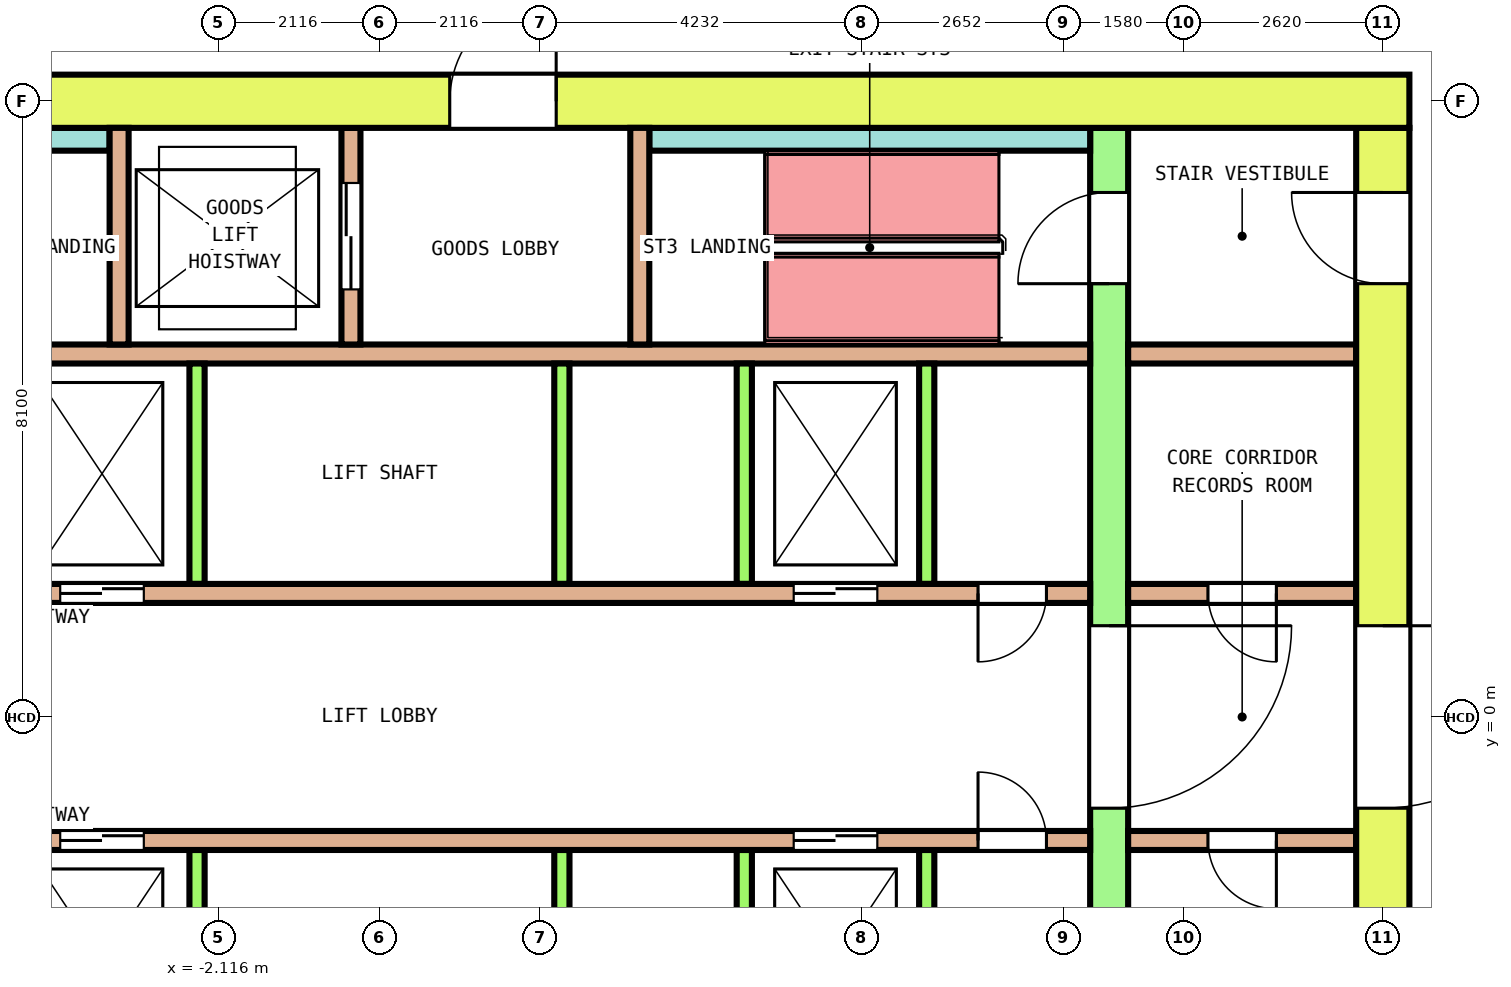
"""IFC4 building model, lengths in metres.
Left out: names, types, materials, properties, quantities, classifications, styles, units other than length and angle.
Written with IfcOpenShell. Run it as: python <this file> out.ifc"""

import sys

from ifc_helpers import new_model, si_unit, direction, frame, frame_2d, origin, place, context, subcontext, project, spatial, rectangle, extrude, element, fill, save


model = new_model("IFC4")
c1 = context("Model", 3, precision=1e-05, world=origin(), true_north=direction((0.0, 1.0)))
c2 = subcontext(c1, "Body", "Model", "MODEL_VIEW")
j1 = project(units=[si_unit("LENGTHUNIT", "METRE"), si_unit("PLANEANGLEUNIT", "RADIAN")], contexts=[c1])
p1 = place(None, origin())
s1 = spatial("IfcSite", under=j1, at=p1, CompositionType="ELEMENT")
p2 = place(p1, origin())
s2 = spatial("IfcBuilding", under=s1, at=p2, CompositionType="ELEMENT")
p3 = place(p2, frame((0.0, 0.0, 180.4)))
s3 = spatial("IfcBuildingStorey", under=s2, at=p3, CompositionType="ELEMENT", Elevation=180.4)
p4 = place(p3, frame((-13.55, 8.1, 0.0), z_axis=(0.0, 0.0, 1.0), x_axis=(1.0, 0.0, 0.0)))
e1 = element("IfcWall", 1, at=p4, inside=s3, PredefinedType="SHEAR", context=c2, shape_type="SweptSolid", body=[
    extrude(rectangle(XDim=27.1, YDim=0.7, at=frame_2d((13.55, 0.0))), origin(), (0.0, 0.0, 1.0), 4.1),
])
p5 = place(p4, frame((14.475, 0.0, 0.0)))
e2 = element("IfcOpeningElement", 2, at=p5, cuts=e1, PredefinedType="OPENING", context=c2, shape_type="SweptSolid", body=[
    extrude(rectangle(XDim=1.4, YDim=2.1, at=frame_2d((0.7, 1.05))), frame((0.0, 0.36, 0.0), z_axis=(0.0, -1.0, 0.0), x_axis=(1.0, 0.0, 0.0)), (0.0, 0.0, 1.0), 0.72),
])
p6 = place(p3, frame((13.2, -7.75, 0.0), z_axis=(0.0, 0.0, 1.0), x_axis=(0.0, 1.0, 0.0)))
e3 = element("IfcWall", 3, at=p6, inside=s3, PredefinedType="SHEAR", context=c2, shape_type="SweptSolid", body=[
    extrude(rectangle(XDim=15.5, YDim=0.7, at=frame_2d((7.75, 0.0))), origin(), (0.0, 0.0, 1.0), 4.1),
])
p7 = place(p6, frame((6.55, 0.0, 0.0)))
e4 = element("IfcOpeningElement", 4, at=p7, cuts=e3, PredefinedType="OPENING", context=c2, shape_type="SweptSolid", body=[
    extrude(rectangle(XDim=2.4, YDim=2.1, at=frame_2d((1.2, 1.05))), frame((0.0, 0.36, 0.0), z_axis=(0.0, -1.0, 0.0), x_axis=(1.0, 0.0, 0.0)), (0.0, 0.0, 1.0), 0.72),
])
p8 = place(p6, frame((13.45, 0.0, 0.0)))
e5 = element("IfcOpeningElement", 5, at=p8, cuts=e3, PredefinedType="OPENING", context=c2, shape_type="SweptSolid", body=[
    extrude(rectangle(XDim=1.2, YDim=2.1, at=frame_2d((0.6, 1.05))), frame((0.0, 0.36, 0.0), z_axis=(0.0, -1.0, 0.0), x_axis=(1.0, 0.0, 0.0)), (0.0, 0.0, 1.0), 0.72),
])
p9 = place(p6, frame((0.95, 0.0, 0.0)))
e6 = element("IfcOpeningElement", 6, at=p9, cuts=e3, PredefinedType="OPENING", context=c2, shape_type="SweptSolid", body=[
    extrude(rectangle(XDim=1.0, YDim=2.1, at=frame_2d((0.5, 1.05))), frame((0.0, 0.36, 0.0), z_axis=(0.0, -1.0, 0.0), x_axis=(1.0, 0.0, 0.0)), (0.0, 0.0, 1.0), 0.72),
])
p10 = place(p3, frame((9.6, -7.75, 0.0), z_axis=(0.0, 0.0, 1.0), x_axis=(0.0, 1.0, 0.0)))
e7 = element("IfcWall", 7, at=p10, inside=s3, PredefinedType="SHEAR", context=c2, shape_type="SweptSolid", body=[
    extrude(rectangle(XDim=15.5, YDim=0.5, at=frame_2d((7.75, 0.0))), origin(), (0.0, 0.0, 1.0), 4.1),
])
p11 = place(p10, frame((6.55, 0.0, 0.0)))
e8 = element("IfcOpeningElement", 8, at=p11, cuts=e7, PredefinedType="OPENING", context=c2, shape_type="SweptSolid", body=[
    extrude(rectangle(XDim=2.4, YDim=2.1, at=frame_2d((1.2, 1.05))), frame((0.0, 0.26, 0.0), z_axis=(0.0, -1.0, 0.0), x_axis=(1.0, 0.0, 0.0)), (0.0, 0.0, 1.0), 0.52),
])
p12 = place(p10, frame((13.45, 0.0, 0.0)))
e9 = element("IfcOpeningElement", 9, at=p12, cuts=e7, PredefinedType="OPENING", context=c2, shape_type="SweptSolid", body=[
    extrude(rectangle(XDim=1.2, YDim=2.1, at=frame_2d((0.6, 1.05))), frame((0.0, 0.26, 0.0), z_axis=(0.0, -1.0, 0.0), x_axis=(1.0, 0.0, 0.0)), (0.0, 0.0, 1.0), 0.52),
])
p13 = place(p10, frame((0.95, 0.0, 0.0)))
e10 = element("IfcOpeningElement", 10, at=p13, cuts=e7, PredefinedType="OPENING", context=c2, shape_type="SweptSolid", body=[
    extrude(rectangle(XDim=1.0, YDim=2.1, at=frame_2d((0.5, 1.05))), frame((0.0, 0.26, 0.0), z_axis=(0.0, -1.0, 0.0), x_axis=(1.0, 0.0, 0.0)), (0.0, 0.0, 1.0), 0.52),
])
p14 = place(p3, frame((-9.35, 1.625, 0.0), z_axis=(0.0, 0.0, 1.0), x_axis=(1.0, 0.0, 0.0)))
e11 = element("IfcWall", 11, at=p14, inside=s3, PredefinedType="SOLIDWALL", context=c2, shape_type="SweptSolid", body=[
    extrude(rectangle(XDim=18.7, YDim=0.25, at=frame_2d((9.35, 0.0))), origin(), (0.0, 0.0, 1.0), 4.1),
])
p15 = place(p14, frame((2.85, 0.0, 0.0)))
e12 = element("IfcOpeningElement", 12, at=p15, cuts=e11, PredefinedType="OPENING", context=c2, shape_type="SweptSolid", body=[
    extrude(rectangle(XDim=1.1, YDim=2.1, at=frame_2d((0.55, 1.05))), frame((0.0, 0.135, 0.0), z_axis=(0.0, -1.0, 0.0), x_axis=(1.0, 0.0, 0.0)), (0.0, 0.0, 1.0), 0.27),
])
p16 = place(p14, frame((5.15, 0.0, 0.0)))
e13 = element("IfcOpeningElement", 13, at=p16, cuts=e11, PredefinedType="OPENING", context=c2, shape_type="SweptSolid", body=[
    extrude(rectangle(XDim=1.1, YDim=2.1, at=frame_2d((0.55, 1.05))), frame((0.0, 0.135, 0.0), z_axis=(0.0, -1.0, 0.0), x_axis=(1.0, 0.0, 0.0)), (0.0, 0.0, 1.0), 0.27),
])
p17 = place(p14, frame((14.8, 0.0, 0.0)))
e14 = element("IfcOpeningElement", 14, at=p17, cuts=e11, PredefinedType="OPENING", context=c2, shape_type="SweptSolid", body=[
    extrude(rectangle(XDim=1.1, YDim=2.1, at=frame_2d((0.55, 1.05))), frame((0.0, 0.135, 0.0), z_axis=(0.0, -1.0, 0.0), x_axis=(1.0, 0.0, 0.0)), (0.0, 0.0, 1.0), 0.27),
])
p18 = place(p14, frame((0.575, 0.0, 0.0)))
e15 = element("IfcOpeningElement", 15, at=p18, cuts=e11, PredefinedType="OPENING", context=c2, shape_type="SweptSolid", body=[
    extrude(rectangle(XDim=0.9, YDim=2.1, at=frame_2d((0.45, 1.05))), frame((0.0, 0.135, 0.0), z_axis=(0.0, -1.0, 0.0), x_axis=(1.0, 0.0, 0.0)), (0.0, 0.0, 1.0), 0.27),
])
p19 = place(p14, frame((17.225, 0.0, 0.0)))
e16 = element("IfcOpeningElement", 16, at=p19, cuts=e11, PredefinedType="OPENING", context=c2, shape_type="SweptSolid", body=[
    extrude(rectangle(XDim=0.9, YDim=2.1, at=frame_2d((0.45, 1.05))), frame((0.0, 0.135, 0.0), z_axis=(0.0, -1.0, 0.0), x_axis=(1.0, 0.0, 0.0)), (0.0, 0.0, 1.0), 0.27),
])
p20 = place(p3, frame((9.85, 1.625, 0.0), z_axis=(0.0, 0.0, 1.0), x_axis=(1.0, 0.0, 0.0)))
e17 = element("IfcWall", 17, at=p20, inside=s3, PredefinedType="SOLIDWALL", context=c2, shape_type="SweptSolid", body=[
    extrude(rectangle(XDim=3.0, YDim=0.25, at=frame_2d((1.5, 0.0))), origin(), (0.0, 0.0, 1.0), 4.1),
])
p21 = place(p20, frame((1.05, 0.0, 0.0)))
e18 = element("IfcOpeningElement", 18, at=p21, cuts=e17, PredefinedType="OPENING", context=c2, shape_type="SweptSolid", body=[
    extrude(rectangle(XDim=0.9, YDim=2.1, at=frame_2d((0.45, 1.05))), frame((0.0, 0.135, 0.0), z_axis=(0.0, -1.0, 0.0), x_axis=(1.0, 0.0, 0.0)), (0.0, 0.0, 1.0), 0.27),
])
p22 = place(p3, frame((-9.35, 4.775, 0.0), z_axis=(0.0, 0.0, 1.0), x_axis=(1.0, 0.0, 0.0)))
e19 = element("IfcWall", 19, at=p22, inside=s3, PredefinedType="SOLIDWALL", context=c2, shape_type="SweptSolid", body=[
    extrude(rectangle(XDim=18.7, YDim=0.25, at=frame_2d((9.35, 0.0))), origin(), (0.0, 0.0, 1.0), 4.1),
])
p23 = place(p3, frame((9.85, 4.775, 0.0), z_axis=(0.0, 0.0, 1.0), x_axis=(1.0, 0.0, 0.0)))
e20 = element("IfcWall", 20, at=p23, inside=s3, PredefinedType="SOLIDWALL", context=c2, shape_type="SweptSolid", body=[
    extrude(rectangle(XDim=3.0, YDim=0.25, at=frame_2d((1.5, 0.0))), origin(), (0.0, 0.0, 1.0), 4.1),
])
for number, where, z_axis, x_axis in (
    (21, (-2.4, 1.75, 0.0), (0.0, 0.0, 1.0), (0.0, 1.0, 0.0)),
    (22, (2.4, 1.75, 0.0), (0.0, 0.0, 1.0), (0.0, 1.0, 0.0)),
    (23, (4.8, 1.75, 0.0), (0.0, 0.0, 1.0), (0.0, 1.0, 0.0)),
    (24, (7.2, 1.75, 0.0), (0.0, 0.0, 1.0), (0.0, 1.0, 0.0)),
):
    element("IfcWall", number, at=place(p3, frame(where, z_axis=z_axis, x_axis=x_axis)), inside=s3, PredefinedType="SOLIDWALL", context=c2, shape_type="SweptSolid", body=[
        extrude(rectangle(XDim=2.9, YDim=0.2, at=frame_2d((1.45, 0.0))), origin(), (0.0, 0.0, 1.0), 4.1),
    ])
p24 = place(p3, frame((-9.35, -1.625, 0.0), z_axis=(0.0, 0.0, 1.0), x_axis=(1.0, 0.0, 0.0)))
e25 = element("IfcWall", 25, at=p24, inside=s3, PredefinedType="SOLIDWALL", context=c2, shape_type="SweptSolid", body=[
    extrude(rectangle(XDim=18.7, YDim=0.25, at=frame_2d((9.35, 0.0))), origin(), (0.0, 0.0, 1.0), 4.1),
])
p25 = place(p24, frame((2.85, 0.0, 0.0)))
e26 = element("IfcOpeningElement", 26, at=p25, cuts=e25, PredefinedType="OPENING", context=c2, shape_type="SweptSolid", body=[
    extrude(rectangle(XDim=1.1, YDim=2.1, at=frame_2d((0.55, 1.05))), frame((0.0, 0.135, 0.0), z_axis=(0.0, -1.0, 0.0), x_axis=(1.0, 0.0, 0.0)), (0.0, 0.0, 1.0), 0.27),
])
p26 = place(p24, frame((5.15, 0.0, 0.0)))
e27 = element("IfcOpeningElement", 27, at=p26, cuts=e25, PredefinedType="OPENING", context=c2, shape_type="SweptSolid", body=[
    extrude(rectangle(XDim=1.1, YDim=2.1, at=frame_2d((0.55, 1.05))), frame((0.0, 0.135, 0.0), z_axis=(0.0, -1.0, 0.0), x_axis=(1.0, 0.0, 0.0)), (0.0, 0.0, 1.0), 0.27),
])
p27 = place(p24, frame((14.8, 0.0, 0.0)))
e28 = element("IfcOpeningElement", 28, at=p27, cuts=e25, PredefinedType="OPENING", context=c2, shape_type="SweptSolid", body=[
    extrude(rectangle(XDim=1.1, YDim=2.1, at=frame_2d((0.55, 1.05))), frame((0.0, 0.135, 0.0), z_axis=(0.0, -1.0, 0.0), x_axis=(1.0, 0.0, 0.0)), (0.0, 0.0, 1.0), 0.27),
])
p28 = place(p24, frame((0.575, 0.0, 0.0)))
e29 = element("IfcOpeningElement", 29, at=p28, cuts=e25, PredefinedType="OPENING", context=c2, shape_type="SweptSolid", body=[
    extrude(rectangle(XDim=0.9, YDim=2.1, at=frame_2d((0.45, 1.05))), frame((0.0, 0.135, 0.0), z_axis=(0.0, -1.0, 0.0), x_axis=(1.0, 0.0, 0.0)), (0.0, 0.0, 1.0), 0.27),
])
p29 = place(p24, frame((17.225, 0.0, 0.0)))
e30 = element("IfcOpeningElement", 30, at=p29, cuts=e25, PredefinedType="OPENING", context=c2, shape_type="SweptSolid", body=[
    extrude(rectangle(XDim=0.9, YDim=2.1, at=frame_2d((0.45, 1.05))), frame((0.0, 0.135, 0.0), z_axis=(0.0, -1.0, 0.0), x_axis=(1.0, 0.0, 0.0)), (0.0, 0.0, 1.0), 0.27),
])
p30 = place(p3, frame((9.85, -1.625, 0.0), z_axis=(0.0, 0.0, 1.0), x_axis=(1.0, 0.0, 0.0)))
e31 = element("IfcWall", 31, at=p30, inside=s3, PredefinedType="SOLIDWALL", context=c2, shape_type="SweptSolid", body=[
    extrude(rectangle(XDim=3.0, YDim=0.25, at=frame_2d((1.5, 0.0))), origin(), (0.0, 0.0, 1.0), 4.1),
])
p31 = place(p30, frame((1.05, 0.0, 0.0)))
e32 = element("IfcOpeningElement", 32, at=p31, cuts=e31, PredefinedType="OPENING", context=c2, shape_type="SweptSolid", body=[
    extrude(rectangle(XDim=0.9, YDim=2.1, at=frame_2d((0.45, 1.05))), frame((0.0, 0.135, 0.0), z_axis=(0.0, -1.0, 0.0), x_axis=(1.0, 0.0, 0.0)), (0.0, 0.0, 1.0), 0.27),
])
for number, where, z_axis, x_axis in (
    (33, (-2.4, -4.65, 0.0), (0.0, 0.0, 1.0), (0.0, 1.0, 0.0)),
    (34, (2.4, -4.65, 0.0), (0.0, 0.0, 1.0), (0.0, 1.0, 0.0)),
    (35, (4.8, -4.65, 0.0), (0.0, 0.0, 1.0), (0.0, 1.0, 0.0)),
    (36, (7.2, -4.65, 0.0), (0.0, 0.0, 1.0), (0.0, 1.0, 0.0)),
):
    element("IfcWall", number, at=place(p3, frame(where, z_axis=z_axis, x_axis=x_axis)), inside=s3, PredefinedType="SOLIDWALL", context=c2, shape_type="SweptSolid", body=[
        extrude(rectangle(XDim=2.9, YDim=0.2, at=frame_2d((1.45, 0.0))), origin(), (0.0, 0.0, 1.0), 4.1),
    ])
for number, where, z_axis, x_axis in (
    (37, (-9.35, 7.6, 0.0), (0.0, 0.0, 1.0), (1.0, 0.0, 0.0)),
    (38, (3.55, 7.6, 0.0), (0.0, 0.0, 1.0), (1.0, 0.0, 0.0)),
):
    element("IfcWall", number, at=place(p3, frame(where, z_axis=z_axis, x_axis=x_axis)), inside=s3, PredefinedType="SOLIDWALL", context=c2, shape_type="SweptSolid", body=[
        extrude(rectangle(XDim=5.8, YDim=0.3, at=frame_2d((2.9, 0.0))), origin(), (0.0, 0.0, 1.0), 4.1),
    ])
p32 = place(p3, frame((-3.425, 4.9, 0.0), z_axis=(0.0, 0.0, 1.0), x_axis=(0.0, 1.0, 0.0)))
e39 = element("IfcWall", 39, at=p32, inside=s3, PredefinedType="SOLIDWALL", context=c2, shape_type="SweptSolid", body=[
    extrude(rectangle(XDim=2.85, YDim=0.25, at=frame_2d((1.425, 0.0))), origin(), (0.0, 0.0, 1.0), 4.1),
])
p33 = place(p3, frame((-0.375, 4.9, 0.0), z_axis=(0.0, 0.0, 1.0), x_axis=(0.0, 1.0, 0.0)))
e40 = element("IfcWall", 40, at=p33, inside=s3, PredefinedType="SOLIDWALL", context=c2, shape_type="SweptSolid", body=[
    extrude(rectangle(XDim=2.85, YDim=0.25, at=frame_2d((1.425, 0.0))), origin(), (0.0, 0.0, 1.0), 4.1),
])
p34 = place(p33, frame((0.725, 0.0, 0.0)))
e41 = element("IfcOpeningElement", 41, at=p34, cuts=e40, PredefinedType="OPENING", context=c2, shape_type="SweptSolid", body=[
    extrude(rectangle(XDim=1.4, YDim=2.1, at=frame_2d((0.7, 1.05))), frame((0.0, 0.135, 0.0), z_axis=(0.0, -1.0, 0.0), x_axis=(1.0, 0.0, 0.0)), (0.0, 0.0, 1.0), 0.27),
])
p35 = place(p3, frame((3.425, 4.9, 0.0), z_axis=(0.0, 0.0, 1.0), x_axis=(0.0, 1.0, 0.0)))
e42 = element("IfcWall", 42, at=p35, inside=s3, PredefinedType="SOLIDWALL", context=c2, shape_type="SweptSolid", body=[
    extrude(rectangle(XDim=2.85, YDim=0.25, at=frame_2d((1.425, 0.0))), origin(), (0.0, 0.0, 1.0), 4.1),
])
p36 = place(p16, origin())
e43 = element("IfcDoor", 43, at=p36, inside=s3, OperationType="DOUBLE_DOOR_SLIDING", PredefinedType="DOOR", context=c2, shape_type="SweptSolid", body=[
    extrude(rectangle(XDim=1.1, YDim=2.1, at=frame_2d((0.55, 1.05))), frame((0.0, 0.075, 0.0), z_axis=(0.0, -1.0, 0.0), x_axis=(1.0, 0.0, 0.0)), (0.0, 0.0, 1.0), 0.15),
])
fill(e13, e43)
p37 = place(p17, origin())
e44 = element("IfcDoor", 44, at=p37, inside=s3, OperationType="DOUBLE_DOOR_SLIDING", PredefinedType="DOOR", context=c2, shape_type="SweptSolid", body=[
    extrude(rectangle(XDim=1.1, YDim=2.1, at=frame_2d((0.55, 1.05))), frame((0.0, 0.075, 0.0), z_axis=(0.0, -1.0, 0.0), x_axis=(1.0, 0.0, 0.0)), (0.0, 0.0, 1.0), 0.15),
])
fill(e14, e44)
p38 = place(p26, origin())
e45 = element("IfcDoor", 45, at=p38, inside=s3, OperationType="DOUBLE_DOOR_SLIDING", PredefinedType="DOOR", context=c2, shape_type="SweptSolid", body=[
    extrude(rectangle(XDim=1.1, YDim=2.1, at=frame_2d((0.55, 1.05))), frame((0.0, 0.075, 0.0), z_axis=(0.0, -1.0, 0.0), x_axis=(1.0, 0.0, 0.0)), (0.0, 0.0, 1.0), 0.15),
])
fill(e27, e45)
p39 = place(p27, origin())
e46 = element("IfcDoor", 46, at=p39, inside=s3, OperationType="DOUBLE_DOOR_SLIDING", PredefinedType="DOOR", context=c2, shape_type="SweptSolid", body=[
    extrude(rectangle(XDim=1.1, YDim=2.1, at=frame_2d((0.55, 1.05))), frame((0.0, 0.075, 0.0), z_axis=(0.0, -1.0, 0.0), x_axis=(1.0, 0.0, 0.0)), (0.0, 0.0, 1.0), 0.15),
])
fill(e28, e46)
p40 = place(p34, origin())
e47 = element("IfcDoor", 47, at=p40, inside=s3, OperationType="DOUBLE_DOOR_SLIDING", PredefinedType="DOOR", context=c2, shape_type="SweptSolid", body=[
    extrude(rectangle(XDim=1.4, YDim=2.1, at=frame_2d((0.7, 1.05))), frame((0.0, 0.075, 0.0), z_axis=(0.0, -1.0, 0.0), x_axis=(1.0, 0.0, 0.0)), (0.0, 0.0, 1.0), 0.15),
])
fill(e41, e47)
p41 = place(p11, origin())
e48 = element("IfcDoor", 48, at=p41, inside=s3, OperationType="DOUBLE_DOOR_SINGLE_SWING", PredefinedType="DOOR", context=c2, shape_type="SweptSolid", body=[
    extrude(rectangle(XDim=2.4, YDim=2.1, at=frame_2d((1.2, 1.05))), frame((0.0, 0.2, 0.0), z_axis=(0.0, -1.0, 0.0), x_axis=(1.0, 0.0, 0.0)), (0.0, 0.0, 1.0), 0.4),
])
fill(e8, e48)
p42 = place(p7, origin())
e49 = element("IfcDoor", 49, at=p42, inside=s3, OperationType="DOUBLE_DOOR_SINGLE_SWING", PredefinedType="DOOR", context=c2, shape_type="SweptSolid", body=[
    extrude(rectangle(XDim=2.4, YDim=2.1, at=frame_2d((1.2, 1.05))), frame((0.0, 0.3, 0.0), z_axis=(0.0, -1.0, 0.0), x_axis=(1.0, 0.0, 0.0)), (0.0, 0.0, 1.0), 0.6),
])
fill(e4, e49)
p43 = place(p12, origin())
e50 = element("IfcDoor", 50, at=p43, inside=s3, OperationType="SINGLE_SWING_LEFT", PredefinedType="DOOR", context=c2, shape_type="SweptSolid", body=[
    extrude(rectangle(XDim=1.2, YDim=2.1, at=frame_2d((0.6, 1.05))), frame((0.0, 0.2, 0.0), z_axis=(0.0, -1.0, 0.0), x_axis=(1.0, 0.0, 0.0)), (0.0, 0.0, 1.0), 0.4),
])
fill(e9, e50)
p44 = place(p8, origin())
e51 = element("IfcDoor", 51, at=p44, inside=s3, OperationType="SINGLE_SWING_RIGHT", PredefinedType="DOOR", context=c2, shape_type="SweptSolid", body=[
    extrude(rectangle(XDim=1.2, YDim=2.1, at=frame_2d((0.6, 1.05))), frame((0.0, 0.3, 0.0), z_axis=(0.0, -1.0, 0.0), x_axis=(1.0, 0.0, 0.0)), (0.0, 0.0, 1.0), 0.6),
])
fill(e5, e51)
p45 = place(p5, origin())
e52 = element("IfcDoor", 52, at=p45, inside=s3, OperationType="DOUBLE_DOOR_SINGLE_SWING", PredefinedType="DOOR", context=c2, shape_type="SweptSolid", body=[
    extrude(rectangle(XDim=1.4, YDim=2.1, at=frame_2d((0.7, 1.05))), frame((0.0, 0.3, 0.0), z_axis=(0.0, -1.0, 0.0), x_axis=(1.0, 0.0, 0.0)), (0.0, 0.0, 1.0), 0.6),
])
fill(e2, e52)
p46 = place(p19, origin())
e53 = element("IfcDoor", 53, at=p46, inside=s3, OperationType="SINGLE_SWING_LEFT", PredefinedType="DOOR", context=c2, shape_type="SweptSolid", body=[
    extrude(rectangle(XDim=0.9, YDim=2.1, at=frame_2d((0.45, 1.05))), frame((0.0, 0.075, 0.0), z_axis=(0.0, -1.0, 0.0), x_axis=(1.0, 0.0, 0.0)), (0.0, 0.0, 1.0), 0.15),
])
fill(e16, e53)
p47 = place(p21, origin())
e54 = element("IfcDoor", 54, at=p47, inside=s3, OperationType="SINGLE_SWING_RIGHT", PredefinedType="DOOR", context=c2, shape_type="SweptSolid", body=[
    extrude(rectangle(XDim=0.9, YDim=2.1, at=frame_2d((0.45, 1.05))), frame((0.0, 0.075, 0.0), z_axis=(0.0, -1.0, 0.0), x_axis=(1.0, 0.0, 0.0)), (0.0, 0.0, 1.0), 0.15),
])
fill(e18, e54)
p48 = place(p29, origin())
e55 = element("IfcDoor", 55, at=p48, inside=s3, OperationType="SINGLE_SWING_LEFT", PredefinedType="DOOR", context=c2, shape_type="SweptSolid", body=[
    extrude(rectangle(XDim=0.9, YDim=2.1, at=frame_2d((0.45, 1.05))), frame((0.0, 0.075, 0.0), z_axis=(0.0, -1.0, 0.0), x_axis=(1.0, 0.0, 0.0)), (0.0, 0.0, 1.0), 0.15),
])
fill(e30, e55)
p49 = place(p31, origin())
e56 = element("IfcDoor", 56, at=p49, inside=s3, OperationType="SINGLE_SWING_RIGHT", PredefinedType="DOOR", context=c2, shape_type="SweptSolid", body=[
    extrude(rectangle(XDim=0.9, YDim=2.1, at=frame_2d((0.45, 1.05))), frame((0.0, 0.075, 0.0), z_axis=(0.0, -1.0, 0.0), x_axis=(1.0, 0.0, 0.0)), (0.0, 0.0, 1.0), 0.15),
])
fill(e32, e56)
save(model, sys.argv[1])
